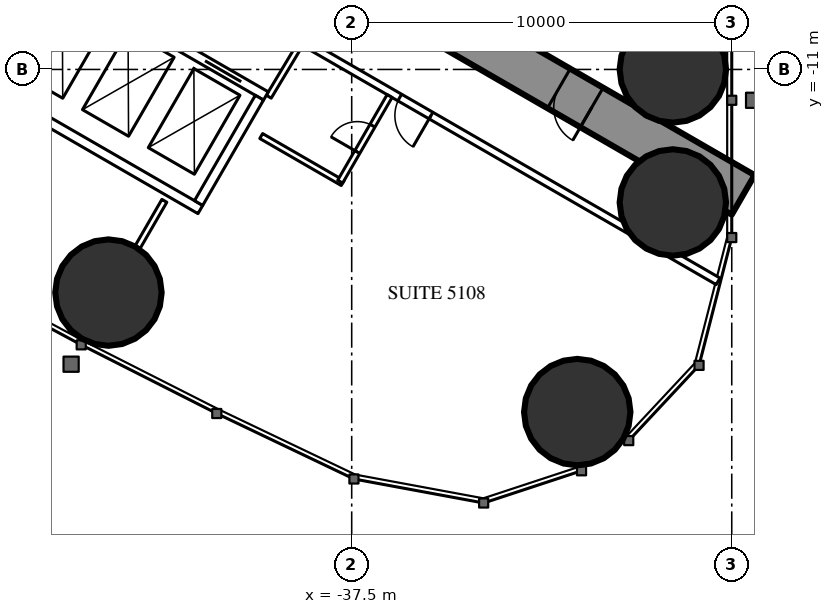
"""IFC4 building model, lengths in metres.
Left out: names, types, materials, properties, quantities, classifications, styles, units other than length and angle.
Written with IfcOpenShell. Run it as: python <this file> out.ifc"""

import sys

from ifc_helpers import new_model, si_unit, direction, frame, frame_2d, origin, origin_2d, place, context, subcontext, project, spatial, rectangle, circle, extrude, element, fill, save


model = new_model("IFC4")
c1 = context("Model", 3, precision=1e-05, world=origin(), true_north=direction((0.0, 1.0)))
c2 = subcontext(c1, "Body", "Model", "MODEL_VIEW")
j1 = project(units=[si_unit("LENGTHUNIT", "METRE"), si_unit("PLANEANGLEUNIT", "RADIAN")], contexts=[c1])
p1 = place(None, origin())
s1 = spatial("IfcSite", under=j1, at=p1, CompositionType="ELEMENT")
p2 = place(p1, origin())
s2 = spatial("IfcBuilding", under=s1, at=p2, CompositionType="ELEMENT")
p3 = place(p2, frame((0.0, 0.0, 191.3)))
s3 = spatial("IfcBuildingStorey", under=s2, at=p3, CompositionType="ELEMENT", Elevation=191.3)
for number, where, z_axis, x_axis in (
    (1, (-31.565, -20.016, 0.0), (0.0, 0.0, 1.0), (1.0, 0.0, 0.0)),
    (2, (-29.05, -11.0, 0.0), (0.0, 0.0, 1.0), (1.0, 0.0, 0.0)),
    (3, (-29.05, -14.5, 0.0), (0.0, 0.0, 1.0), (1.0, 0.0, 0.0)),
    (4, (-43.9, -16.871, 0.0), (0.0, 0.0, 1.0), (1.0, 0.0, 0.0)),
):
    element("IfcColumn", number, at=place(p3, frame(where, z_axis=z_axis, x_axis=x_axis)), inside=s3, PredefinedType="COLUMN", context=c2, shape_type="SweptSolid", body=[
        extrude(circle(Radius=1.4, at=origin_2d()), origin(), (0.0, 0.0, 1.0), 3.5),
    ])
p4 = place(p3, frame((-27.2, -14.3, 0.0), z_axis=(0.0, 0.0, 1.0), x_axis=(-0.866024021859, 0.500002393557, 0.0)))
e5 = element("IfcWall", 5, at=p4, inside=s3, PredefinedType="SHEAR", context=c2, shape_type="SweptSolid", body=[
    extrude(rectangle(XDim=27.907, YDim=1.2, at=frame_2d((13.954, 0.0))), origin(), (0.0, 0.0, 1.0), 3.5),
])
p5 = place(p4, frame((4.6, 0.0, 0.0)))
e6 = element("IfcOpeningElement", 6, at=p5, cuts=e5, PredefinedType="OPENING", context=c2, shape_type="SweptSolid", body=[
    extrude(rectangle(XDim=1.0, YDim=2.2, at=frame_2d((0.5, 1.1))), frame((0.0, 0.61, 0.0), z_axis=(0.0, -1.0, 0.0), x_axis=(1.0, 0.0, 0.0)), (0.0, 0.0, 1.0), 1.22),
])
p6 = place(p4, frame((13.395, 0.0, 0.0)))
e7 = element("IfcOpeningElement", 7, at=p6, cuts=e5, PredefinedType="OPENING", context=c2, shape_type="SweptSolid", body=[
    extrude(rectangle(XDim=1.8, YDim=2.2, at=frame_2d((0.9, 1.1))), frame((0.0, 0.61, 0.0), z_axis=(0.0, -1.0, 0.0), x_axis=(1.0, 0.0, 0.0)), (0.0, 0.0, 1.0), 1.22),
])
p7 = place(p3, frame((-42.429, -14.457, 0.0), z_axis=(0.0, 0.0, 1.0), x_axis=(-0.5000578829, -0.865991982497, 0.0)))
e8 = element("IfcWall", 8, at=p7, inside=s3, PredefinedType="PARTITIONING", context=c2, shape_type="SweptSolid", body=[
    extrude(rectangle(XDim=1.407, YDim=0.15, at=frame_2d((0.704, 0.0))), origin(), (0.0, 0.0, 1.0), 3.25),
])
p8 = place(p3, frame((-27.86, -16.575, 0.0), z_axis=(0.0, 0.0, 1.0), x_axis=(-0.866027756871, 0.499995924312, 0.0)))
e9 = element("IfcWall", 9, at=p8, inside=s3, PredefinedType="PARTITIONING", context=c2, shape_type="SweptSolid", body=[
    extrude(rectangle(XDim=12.622, YDim=0.2, at=frame_2d((6.311, 0.0))), origin(), (0.0, 0.0, 1.0), 3.25),
])
p9 = place(p8, frame((8.722, 0.0, 0.0)))
e10 = element("IfcOpeningElement", 10, at=p9, cuts=e9, PredefinedType="OPENING", context=c2, shape_type="SweptSolid", body=[
    extrude(rectangle(XDim=0.95, YDim=2.2, at=frame_2d((0.475, 1.1))), frame((0.0, 0.11, 0.0), z_axis=(0.0, -1.0, 0.0), x_axis=(1.0, 0.0, 0.0)), (0.0, 0.0, 1.0), 0.22),
])
p10 = place(p3, frame((-39.683, -11.718, 0.0), z_axis=(0.0, 0.0, 1.0), x_axis=(0.514336634837, 0.857588377991, 0.0)))
e11 = element("IfcWall", 11, at=p10, inside=s3, PredefinedType="PARTITIONING", context=c2, shape_type="SweptSolid", body=[
    extrude(rectangle(XDim=1.805, YDim=0.15, at=frame_2d((0.903, 0.0))), origin(), (0.0, 0.0, 1.0), 3.25),
])
p11 = place(p3, frame((-37.738, -13.989, 0.0), z_axis=(0.0, 0.0, 1.0), x_axis=(-0.86604923931, 0.499958713387, 0.0)))
e12 = element("IfcWall", 12, at=p11, inside=s3, PredefinedType="PARTITIONING", context=c2, shape_type="SweptSolid", body=[
    extrude(rectangle(XDim=2.475, YDim=0.15, at=frame_2d((1.237, 0.0))), origin(), (0.0, 0.0, 1.0), 3.25),
])
p12 = place(p3, frame((-36.503, -11.7, 0.0), z_axis=(0.0, 0.0, 1.0), x_axis=(-0.500006934395, -0.866021400173, 0.0)))
e13 = element("IfcWall", 13, at=p12, inside=s3, PredefinedType="PARTITIONING", context=c2, shape_type="SweptSolid", body=[
    extrude(rectangle(XDim=2.6, YDim=0.15, at=frame_2d((1.3, 0.0))), origin(), (0.0, 0.0, 1.0), 3.25),
])
p13 = place(p12, frame((0.9, 0.0, 0.0)))
e14 = element("IfcOpeningElement", 14, at=p13, cuts=e13, PredefinedType="OPENING", context=c2, shape_type="SweptSolid", body=[
    extrude(rectangle(XDim=0.8, YDim=2.2, at=frame_2d((0.4, 1.1))), frame((0.0, 0.085, 0.0), z_axis=(0.0, -1.0, 0.0), x_axis=(1.0, 0.0, 0.0)), (0.0, 0.0, 1.0), 0.17),
])
p14 = place(p3, frame((-39.758, -11.697, 0.0), z_axis=(0.0, 0.0, 1.0), x_axis=(-0.866024194504, 0.500002094529, 0.0)))
e15 = element("IfcWall", 15, at=p14, inside=s3, PredefinedType="PARTITIONING", context=c2, shape_type="SweptSolid", body=[
    extrude(rectangle(XDim=6.6, YDim=0.25, at=frame_2d((3.3, 0.0))), origin(), (0.0, 0.0, 1.0), 3.25),
])
p15 = place(p14, frame((0.75, 0.0, 0.0)))
e16 = element("IfcOpeningElement", 16, at=p15, cuts=e15, PredefinedType="OPENING", context=c2, shape_type="SweptSolid", body=[
    extrude(rectangle(XDim=1.1, YDim=2.2, at=frame_2d((0.55, 1.1))), frame((0.0, 0.135, 0.0), z_axis=(0.0, -1.0, 0.0), x_axis=(1.0, 0.0, 0.0)), (0.0, 0.0, 1.0), 0.27),
])
p16 = place(p14, frame((2.75, 0.0, 0.0)))
e17 = element("IfcOpeningElement", 17, at=p16, cuts=e15, PredefinedType="OPENING", context=c2, shape_type="SweptSolid", body=[
    extrude(rectangle(XDim=1.1, YDim=2.2, at=frame_2d((0.55, 1.1))), frame((0.0, 0.135, 0.0), z_axis=(0.0, -1.0, 0.0), x_axis=(1.0, 0.0, 0.0)), (0.0, 0.0, 1.0), 0.27),
])
p17 = place(p14, frame((4.75, 0.0, 0.0)))
e18 = element("IfcOpeningElement", 18, at=p17, cuts=e15, PredefinedType="OPENING", context=c2, shape_type="SweptSolid", body=[
    extrude(rectangle(XDim=1.1, YDim=2.2, at=frame_2d((0.55, 1.1))), frame((0.0, 0.135, 0.0), z_axis=(0.0, -1.0, 0.0), x_axis=(1.0, 0.0, 0.0)), (0.0, 0.0, 1.0), 0.27),
])
p18 = place(p3, frame((-41.482, -14.686, 0.0), z_axis=(0.0, 0.0, 1.0), x_axis=(-0.86603344179, 0.499986077507, 0.0)))
e19 = element("IfcWall", 19, at=p18, inside=s3, PredefinedType="PARTITIONING", context=c2, shape_type="SweptSolid", body=[
    extrude(rectangle(XDim=6.6, YDim=0.25, at=frame_2d((3.3, 0.0))), origin(), (0.0, 0.0, 1.0), 3.25),
])
for number, where, z_axis, x_axis in (
    (20, (-39.928, -11.743, 0.0), (0.0, 0.0, 1.0), (-0.5, -0.866, 0.0)),
    (21, (-45.428, -8.568, 0.0), (0.0, 0.0, 1.0), (-0.5, -0.866, 0.0)),
):
    element("IfcWall", number, at=place(p3, frame(where, z_axis=z_axis, x_axis=x_axis)), inside=s3, PredefinedType="PARTITIONING", context=c2, shape_type="SweptSolid", body=[
        extrude(rectangle(XDim=3.201, YDim=0.25, at=frame_2d((1.6, 0.0))), origin(), (0.0, 0.0, 1.0), 3.25),
    ])
p19 = place(p13, origin())
e22 = element("IfcDoor", 22, at=p19, inside=s3, OperationType="SINGLE_SWING_RIGHT", PredefinedType="DOOR", context=c2, shape_type="SweptSolid", body=[
    extrude(rectangle(XDim=0.8, YDim=2.2, at=frame_2d((0.4, 1.1))), frame((0.0, 0.025, 0.0), z_axis=(0.0, -1.0, 0.0), x_axis=(1.0, 0.0, 0.0)), (0.0, 0.0, 1.0), 0.05),
])
fill(e14, e22)
p20 = place(p9, origin())
e23 = element("IfcDoor", 23, at=p20, inside=s3, OperationType="SINGLE_SWING_LEFT", PredefinedType="DOOR", context=c2, shape_type="SweptSolid", body=[
    extrude(rectangle(XDim=0.95, YDim=2.2, at=frame_2d((0.475, 1.1))), frame((0.0, 0.025, 0.0), z_axis=(0.0, -1.0, 0.0), x_axis=(1.0, 0.0, 0.0)), (0.0, 0.0, 1.0), 0.05),
])
fill(e10, e23)
p21 = place(p5, origin())
e24 = element("IfcDoor", 24, at=p21, inside=s3, OperationType="SINGLE_SWING_LEFT", PredefinedType="DOOR", context=c2, shape_type="SweptSolid", body=[
    extrude(rectangle(XDim=1.0, YDim=2.2, at=frame_2d((0.5, 1.1))), frame((0.0, 0.025, 0.0), z_axis=(0.0, -1.0, 0.0), x_axis=(1.0, 0.0, 0.0)), (0.0, 0.0, 1.0), 0.05),
])
fill(e6, e24)
p22 = place(p15, origin())
e25 = element("IfcDoor", 25, at=p22, inside=s3, OperationType="DOUBLE_DOOR_SLIDING", PredefinedType="USERDEFINED", context=c2, shape_type="SweptSolid", body=[
    extrude(rectangle(XDim=1.1, YDim=2.2, at=frame_2d((0.55, 1.1))), frame((0.0, 0.025, 0.0), z_axis=(0.0, -1.0, 0.0), x_axis=(1.0, 0.0, 0.0)), (0.0, 0.0, 1.0), 0.05),
])
fill(e16, e25)
save(model, sys.argv[1])
